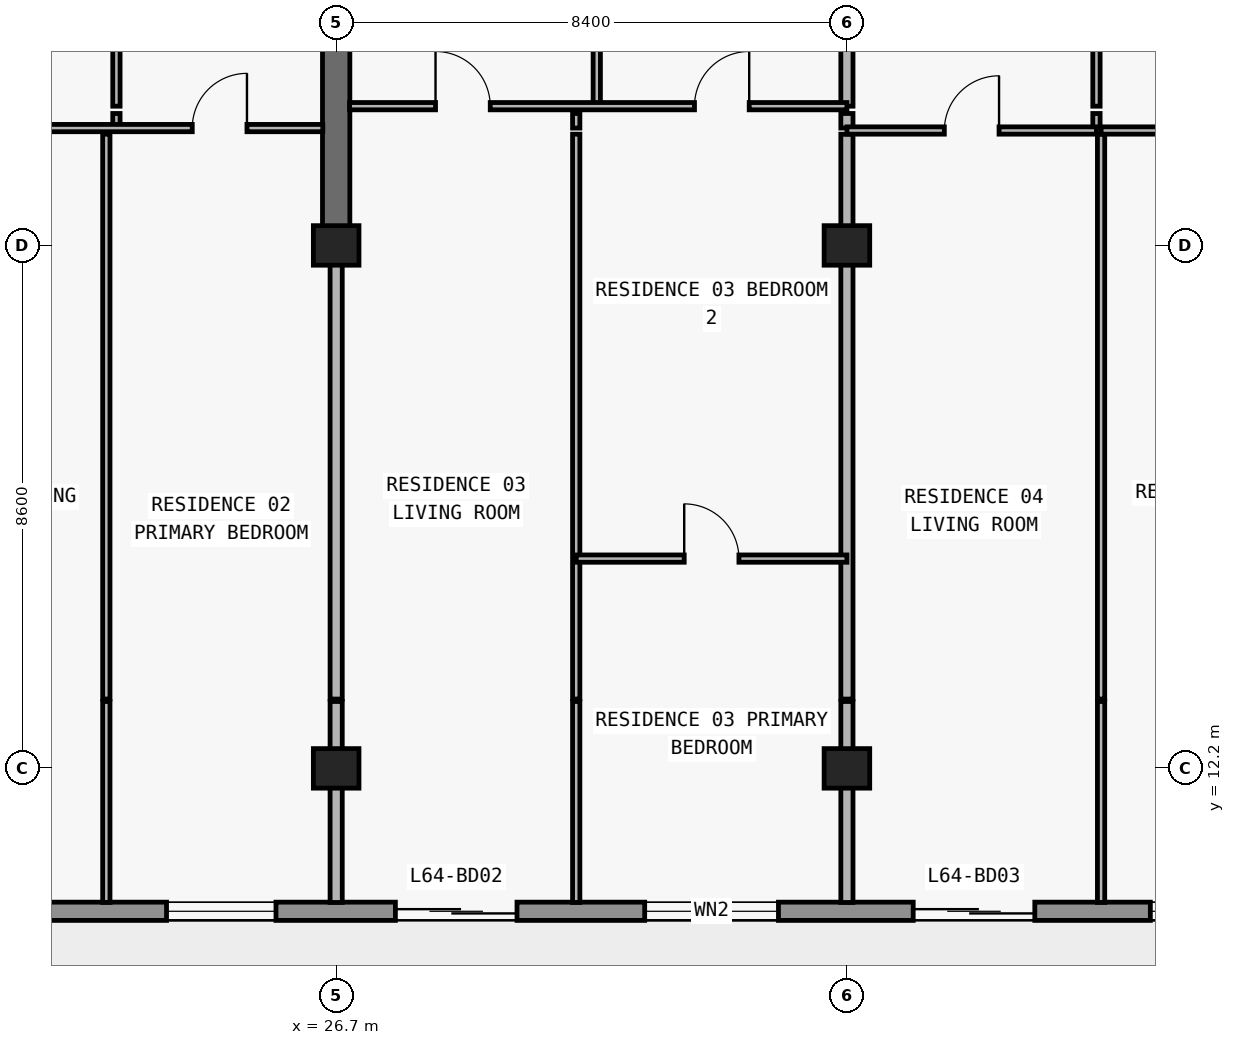
"""IFC4 building model, lengths in metres.
Left out: names, types, materials, properties, quantities, classifications, styles, units other than length and angle.
Written with IfcOpenShell. Run it as: python <this file> out.ifc"""

import sys

from ifc_helpers import new_model, si_unit, direction, frame, frame_2d, origin, origin_2d, place, context, subcontext, project, spatial, rectangle, extrude, element, fill, save


model = new_model("IFC4")
c1 = context("Model", 3, precision=1e-05, world=origin(), true_north=direction((0.0, 1.0)))
c2 = subcontext(c1, "Body", "Model", "MODEL_VIEW")
j1 = project(units=[si_unit("LENGTHUNIT", "METRE"), si_unit("PLANEANGLEUNIT", "RADIAN")], contexts=[c1])
p1 = place(None, origin())
s1 = spatial("IfcSite", under=j1, at=p1, CompositionType="ELEMENT")
p2 = place(p1, origin())
s2 = spatial("IfcBuilding", under=s1, at=p2, CompositionType="ELEMENT")
p3 = place(p2, frame((0.0, 0.0, 229.8)))
s3 = spatial("IfcBuildingStorey", under=s2, at=p3, CompositionType="ELEMENT", Elevation=229.8)
for number, where, z_axis, x_axis in (
    (1, (26.7, 12.2, 0.0), (0.0, 0.0, 1.0), (1.0, 0.0, 0.0)),
    (2, (35.1, 12.2, 0.0), (0.0, 0.0, 1.0), (1.0, 0.0, 0.0)),
    (3, (26.7, 20.8, 0.0), (0.0, 0.0, 1.0), (1.0, 0.0, 0.0)),
    (4, (35.1, 20.8, 0.0), (0.0, 0.0, 1.0), (1.0, 0.0, 0.0)),
):
    element("IfcColumn", number, at=place(p3, frame(where, z_axis=z_axis, x_axis=x_axis)), inside=s3, PredefinedType="COLUMN", context=c2, shape_type="SweptSolid", body=[
        extrude(rectangle(XDim=0.75, YDim=0.65, at=origin_2d()), origin(), (0.0, 0.0, 1.0), 3.05),
    ])
p4 = place(p3, frame((26.7, 20.8, 0.0), z_axis=(0.0, 0.0, 1.0), x_axis=(0.0, 1.0, 0.0)))
e5 = element("IfcWall", 5, at=p4, inside=s3, PredefinedType="SHEAR", context=c2, shape_type="SweptSolid", body=[
    extrude(rectangle(XDim=8.6, YDim=0.45, at=frame_2d((4.3, 0.0))), origin(), (0.0, 0.0, 1.0), 3.05),
])
p5 = place(p3, frame((65.7, 9.85, 0.0), z_axis=(0.0, 0.0, 1.0), x_axis=(-1.0, 0.0, 0.0)))
e6 = element("IfcWall", 6, at=p5, inside=s3, PredefinedType="STANDARD", context=c2, shape_type="SweptSolid", body=[
    extrude(rectangle(XDim=53.6, YDim=0.3, at=frame_2d((26.8, 0.0))), origin(), (0.0, 0.0, 1.0), 3.05),
])
p6 = place(p5, frame((48.05, 0.0, 0.85)))
e7 = element("IfcOpeningElement", 7, at=p6, cuts=e6, PredefinedType="OPENING", context=c2, shape_type="SweptSolid", body=[
    extrude(rectangle(XDim=1.8, YDim=1.55, at=frame_2d((0.9, 0.775))), frame((0.0, 0.16, 0.0), z_axis=(0.0, -1.0, 0.0), x_axis=(1.0, 0.0, 0.0)), (0.0, 0.0, 1.0), 0.32),
])
p7 = place(p5, frame((44.09, 0.0, 0.0)))
e8 = element("IfcOpeningElement", 8, at=p7, cuts=e6, PredefinedType="OPENING", context=c2, shape_type="SweptSolid", body=[
    extrude(rectangle(XDim=2.0, YDim=2.3, at=frame_2d((1.0, 1.15))), frame((0.0, 0.16, 0.0), z_axis=(0.0, -1.0, 0.0), x_axis=(1.0, 0.0, 0.0)), (0.0, 0.0, 1.0), 0.32),
])
p8 = place(p5, frame((39.99, 0.0, 0.85)))
e9 = element("IfcOpeningElement", 9, at=p8, cuts=e6, PredefinedType="OPENING", context=c2, shape_type="SweptSolid", body=[
    extrude(rectangle(XDim=1.8, YDim=1.55, at=frame_2d((0.9, 0.775))), frame((0.0, 0.16, 0.0), z_axis=(0.0, -1.0, 0.0), x_axis=(1.0, 0.0, 0.0)), (0.0, 0.0, 1.0), 0.32),
])
p9 = place(p5, frame((36.026, 0.0, 0.0)))
e10 = element("IfcOpeningElement", 10, at=p9, cuts=e6, PredefinedType="OPENING", context=c2, shape_type="SweptSolid", body=[
    extrude(rectangle(XDim=2.0, YDim=2.3, at=frame_2d((1.0, 1.15))), frame((0.0, 0.16, 0.0), z_axis=(0.0, -1.0, 0.0), x_axis=(1.0, 0.0, 0.0)), (0.0, 0.0, 1.0), 0.32),
])
p10 = place(p5, frame((31.726, 0.0, 0.85)))
e11 = element("IfcOpeningElement", 11, at=p10, cuts=e6, PredefinedType="OPENING", context=c2, shape_type="SweptSolid", body=[
    extrude(rectangle(XDim=2.2, YDim=1.55, at=frame_2d((1.1, 0.775))), frame((0.0, 0.16, 0.0), z_axis=(0.0, -1.0, 0.0), x_axis=(1.0, 0.0, 0.0)), (0.0, 0.0, 1.0), 0.32),
])
p11 = place(p5, frame((27.51, 0.0, 0.0)))
e12 = element("IfcOpeningElement", 12, at=p11, cuts=e6, PredefinedType="OPENING", context=c2, shape_type="SweptSolid", body=[
    extrude(rectangle(XDim=2.0, YDim=2.3, at=frame_2d((1.0, 1.15))), frame((0.0, 0.16, 0.0), z_axis=(0.0, -1.0, 0.0), x_axis=(1.0, 0.0, 0.0)), (0.0, 0.0, 1.0), 0.32),
])
p12 = place(p5, frame((23.81, 0.0, 0.85)))
e13 = element("IfcOpeningElement", 13, at=p12, cuts=e6, PredefinedType="OPENING", context=c2, shape_type="SweptSolid", body=[
    extrude(rectangle(XDim=1.8, YDim=1.55, at=frame_2d((0.9, 0.775))), frame((0.0, 0.16, 0.0), z_axis=(0.0, -1.0, 0.0), x_axis=(1.0, 0.0, 0.0)), (0.0, 0.0, 1.0), 0.32),
])
p13 = place(p5, frame((20.026, 0.0, 0.0)))
e14 = element("IfcOpeningElement", 14, at=p13, cuts=e6, PredefinedType="OPENING", context=c2, shape_type="SweptSolid", body=[
    extrude(rectangle(XDim=2.0, YDim=2.3, at=frame_2d((1.0, 1.15))), frame((0.0, 0.16, 0.0), z_axis=(0.0, -1.0, 0.0), x_axis=(1.0, 0.0, 0.0)), (0.0, 0.0, 1.0), 0.32),
])
p14 = place(p5, frame((15.726, 0.0, 0.85)))
e15 = element("IfcOpeningElement", 15, at=p14, cuts=e6, PredefinedType="OPENING", context=c2, shape_type="SweptSolid", body=[
    extrude(rectangle(XDim=2.2, YDim=1.55, at=frame_2d((1.1, 0.775))), frame((0.0, 0.16, 0.0), z_axis=(0.0, -1.0, 0.0), x_axis=(1.0, 0.0, 0.0)), (0.0, 0.0, 1.0), 0.32),
])
p15 = place(p5, frame((11.29, 0.0, 0.0)))
e16 = element("IfcOpeningElement", 16, at=p15, cuts=e6, PredefinedType="OPENING", context=c2, shape_type="SweptSolid", body=[
    extrude(rectangle(XDim=2.0, YDim=2.3, at=frame_2d((1.0, 1.15))), frame((0.0, 0.16, 0.0), z_axis=(0.0, -1.0, 0.0), x_axis=(1.0, 0.0, 0.0)), (0.0, 0.0, 1.0), 0.32),
])
p16 = place(p5, frame((7.19, 0.0, 0.85)))
e17 = element("IfcOpeningElement", 17, at=p16, cuts=e6, PredefinedType="OPENING", context=c2, shape_type="SweptSolid", body=[
    extrude(rectangle(XDim=1.8, YDim=1.55, at=frame_2d((0.9, 0.775))), frame((0.0, 0.16, 0.0), z_axis=(0.0, -1.0, 0.0), x_axis=(1.0, 0.0, 0.0)), (0.0, 0.0, 1.0), 0.32),
])
p17 = place(p5, frame((0.65, 0.0, 0.85)))
e18 = element("IfcOpeningElement", 18, at=p17, cuts=e6, PredefinedType="OPENING", context=c2, shape_type="SweptSolid", body=[
    extrude(rectangle(XDim=1.8, YDim=1.55, at=frame_2d((0.9, 0.775))), frame((0.0, 0.16, 0.0), z_axis=(0.0, -1.0, 0.0), x_axis=(1.0, 0.0, 0.0)), (0.0, 0.0, 1.0), 0.32),
])
p18 = place(p3, frame((22.92, 9.995, 0.0), z_axis=(0.0, 0.0, 1.0), x_axis=(0.0, 1.0, 0.0)))
e19 = element("IfcWall", 19, at=p18, inside=s3, PredefinedType="PARTITIONING", context=c2, shape_type="SweptSolid", body=[
    extrude(rectangle(XDim=3.305, YDim=0.12, at=frame_2d((1.652, 0.0))), origin(), (0.0, 0.0, 1.0), 3.05),
])
p19 = place(p3, frame((22.92, 13.34, 0.0), z_axis=(0.0, 0.0, 1.0), x_axis=(0.0, 1.0, 0.0)))
e20 = element("IfcWall", 20, at=p19, inside=s3, PredefinedType="PARTITIONING", context=c2, shape_type="SweptSolid", body=[
    extrude(rectangle(XDim=9.29, YDim=0.12, at=frame_2d((4.645, 0.0))), origin(), (0.0, 0.0, 1.0), 3.05),
])
p20 = place(p3, frame((23.086, 22.73, 0.0), z_axis=(0.0, 0.0, 1.0), x_axis=(0.0, 1.0, 0.0)))
e21 = element("IfcWall", 21, at=p20, inside=s3, PredefinedType="PARTITIONING", context=c2, shape_type="SweptSolid", body=[
    extrude(rectangle(XDim=0.24, YDim=0.12, at=frame_2d((0.12, 0.0))), origin(), (0.0, 0.0, 1.0), 3.05),
])
p21 = place(p3, frame((23.086, 23.09, 0.0), z_axis=(0.0, 0.0, 1.0), x_axis=(0.0, 1.0, 0.0)))
e22 = element("IfcWall", 22, at=p21, inside=s3, PredefinedType="PARTITIONING", context=c2, shape_type="SweptSolid", body=[
    extrude(rectangle(XDim=4.69, YDim=0.12, at=frame_2d((2.345, 0.0))), origin(), (0.0, 0.0, 1.0), 3.05),
])
p22 = place(p21, frame((1.895, 0.0, 0.0)))
e23 = element("IfcOpeningElement", 23, at=p22, cuts=e22, PredefinedType="OPENING", context=c2, shape_type="SweptSolid", body=[
    extrude(rectangle(XDim=0.9, YDim=2.15, at=frame_2d((0.45, 1.075))), frame((0.0, 0.07, 0.0), z_axis=(0.0, -1.0, 0.0), x_axis=(1.0, 0.0, 0.0)), (0.0, 0.0, 1.0), 0.14),
])
p23 = place(p3, frame((26.7, 9.995, 0.0), z_axis=(0.0, 0.0, 1.0), x_axis=(0.0, 1.0, 0.0)))
e24 = element("IfcWall", 24, at=p23, inside=s3, PredefinedType="PARTITIONING", context=c2, shape_type="SweptSolid", body=[
    extrude(rectangle(XDim=3.305, YDim=0.2, at=frame_2d((1.652, 0.0))), origin(), (0.0, 0.0, 1.0), 2.263),
])
p24 = place(p3, frame((26.7, 13.34, 0.0), z_axis=(0.0, 0.0, 1.0), x_axis=(0.0, 1.0, 0.0)))
e25 = element("IfcWall", 25, at=p24, inside=s3, PredefinedType="PARTITIONING", context=c2, shape_type="SweptSolid", body=[
    extrude(rectangle(XDim=7.455, YDim=0.2, at=frame_2d((3.728, 0.0))), origin(), (0.0, 0.0, 1.0), 2.263),
])
p25 = place(p3, frame((30.648, 9.995, 0.0), z_axis=(0.0, 0.0, 1.0), x_axis=(0.0, 1.0, 0.0)))
e26 = element("IfcWall", 26, at=p25, inside=s3, PredefinedType="PARTITIONING", context=c2, shape_type="SweptSolid", body=[
    extrude(rectangle(XDim=3.305, YDim=0.12, at=frame_2d((1.652, 0.0))), origin(), (0.0, 0.0, 1.0), 3.05),
])
p26 = place(p3, frame((30.648, 13.34, 0.0), z_axis=(0.0, 0.0, 1.0), x_axis=(0.0, 1.0, 0.0)))
e27 = element("IfcWall", 27, at=p26, inside=s3, PredefinedType="PARTITIONING", context=c2, shape_type="SweptSolid", body=[
    extrude(rectangle(XDim=9.29, YDim=0.12, at=frame_2d((4.645, 0.0))), origin(), (0.0, 0.0, 1.0), 3.05),
])
p27 = place(p3, frame((30.648, 22.73, 0.0), z_axis=(0.0, 0.0, 1.0), x_axis=(0.0, 1.0, 0.0)))
e28 = element("IfcWall", 28, at=p27, inside=s3, PredefinedType="PARTITIONING", context=c2, shape_type="SweptSolid", body=[
    extrude(rectangle(XDim=0.24, YDim=0.12, at=frame_2d((0.12, 0.0))), origin(), (0.0, 0.0, 1.0), 3.05),
])
p28 = place(p3, frame((30.986, 23.09, 0.0), z_axis=(0.0, 0.0, 1.0), x_axis=(0.0, 1.0, 0.0)))
e29 = element("IfcWall", 29, at=p28, inside=s3, PredefinedType="PARTITIONING", context=c2, shape_type="SweptSolid", body=[
    extrude(rectangle(XDim=4.69, YDim=0.12, at=frame_2d((2.345, 0.0))), origin(), (0.0, 0.0, 1.0), 3.05),
])
p29 = place(p28, frame((1.895, 0.0, 0.0)))
e30 = element("IfcOpeningElement", 30, at=p29, cuts=e29, PredefinedType="OPENING", context=c2, shape_type="SweptSolid", body=[
    extrude(rectangle(XDim=0.9, YDim=2.15, at=frame_2d((0.45, 1.075))), frame((0.0, 0.07, 0.0), z_axis=(0.0, -1.0, 0.0), x_axis=(1.0, 0.0, 0.0)), (0.0, 0.0, 1.0), 0.14),
])
p30 = place(p3, frame((35.1, 9.995, 0.0), z_axis=(0.0, 0.0, 1.0), x_axis=(0.0, 1.0, 0.0)))
e31 = element("IfcWall", 31, at=p30, inside=s3, PredefinedType="PARTITIONING", context=c2, shape_type="SweptSolid", body=[
    extrude(rectangle(XDim=3.305, YDim=0.2, at=frame_2d((1.652, 0.0))), origin(), (0.0, 0.0, 1.0), 2.263),
])
p31 = place(p3, frame((35.1, 13.34, 0.0), z_axis=(0.0, 0.0, 1.0), x_axis=(0.0, 1.0, 0.0)))
e32 = element("IfcWall", 32, at=p31, inside=s3, PredefinedType="PARTITIONING", context=c2, shape_type="SweptSolid", body=[
    extrude(rectangle(XDim=9.29, YDim=0.2, at=frame_2d((4.645, 0.0))), origin(), (0.0, 0.0, 1.0), 2.263),
])
p32 = place(p3, frame((35.1, 22.73, 0.0), z_axis=(0.0, 0.0, 1.0), x_axis=(0.0, 1.0, 0.0)))
e33 = element("IfcWall", 33, at=p32, inside=s3, PredefinedType="PARTITIONING", context=c2, shape_type="SweptSolid", body=[
    extrude(rectangle(XDim=0.24, YDim=0.2, at=frame_2d((0.12, 0.0))), origin(), (0.0, 0.0, 1.0), 2.263),
])
p33 = place(p3, frame((35.1, 23.09, 0.0), z_axis=(0.0, 0.0, 1.0), x_axis=(0.0, 1.0, 0.0)))
e34 = element("IfcWall", 34, at=p33, inside=s3, PredefinedType="PARTITIONING", context=c2, shape_type="SweptSolid", body=[
    extrude(rectangle(XDim=4.69, YDim=0.2, at=frame_2d((2.345, 0.0))), origin(), (0.0, 0.0, 1.0), 2.263),
])
p34 = place(p3, frame((39.204, 22.73, 0.0), z_axis=(0.0, 0.0, 1.0), x_axis=(0.0, 1.0, 0.0)))
e35 = element("IfcWall", 35, at=p34, inside=s3, PredefinedType="PARTITIONING", context=c2, shape_type="SweptSolid", body=[
    extrude(rectangle(XDim=0.24, YDim=0.12, at=frame_2d((0.12, 0.0))), origin(), (0.0, 0.0, 1.0), 3.05),
])
p35 = place(p3, frame((39.204, 23.09, 0.0), z_axis=(0.0, 0.0, 1.0), x_axis=(0.0, 1.0, 0.0)))
e36 = element("IfcWall", 36, at=p35, inside=s3, PredefinedType="PARTITIONING", context=c2, shape_type="SweptSolid", body=[
    extrude(rectangle(XDim=4.69, YDim=0.12, at=frame_2d((2.345, 0.0))), origin(), (0.0, 0.0, 1.0), 3.05),
])
p36 = place(p35, frame((1.895, 0.0, 0.0)))
e37 = element("IfcOpeningElement", 37, at=p36, cuts=e36, PredefinedType="OPENING", context=c2, shape_type="SweptSolid", body=[
    extrude(rectangle(XDim=0.9, YDim=2.15, at=frame_2d((0.45, 1.075))), frame((0.0, 0.07, 0.0), z_axis=(0.0, -1.0, 0.0), x_axis=(1.0, 0.0, 0.0)), (0.0, 0.0, 1.0), 0.14),
])
p37 = place(p3, frame((39.28, 9.995, 0.0), z_axis=(0.0, 0.0, 1.0), x_axis=(0.0, 1.0, 0.0)))
e38 = element("IfcWall", 38, at=p37, inside=s3, PredefinedType="PARTITIONING", context=c2, shape_type="SweptSolid", body=[
    extrude(rectangle(XDim=3.305, YDim=0.12, at=frame_2d((1.652, 0.0))), origin(), (0.0, 0.0, 1.0), 3.05),
])
p38 = place(p3, frame((39.28, 13.34, 0.0), z_axis=(0.0, 0.0, 1.0), x_axis=(0.0, 1.0, 0.0)))
e39 = element("IfcWall", 39, at=p38, inside=s3, PredefinedType="PARTITIONING", context=c2, shape_type="SweptSolid", body=[
    extrude(rectangle(XDim=9.29, YDim=0.12, at=frame_2d((4.645, 0.0))), origin(), (0.0, 0.0, 1.0), 3.05),
])
p39 = place(p3, frame((30.648, 15.65, 0.0), z_axis=(0.0, 0.0, 1.0), x_axis=(1.0, 0.0, 0.0)))
e40 = element("IfcWall", 40, at=p39, inside=s3, PredefinedType="PARTITIONING", context=c2, shape_type="SweptSolid", body=[
    extrude(rectangle(XDim=4.452, YDim=0.12, at=frame_2d((2.226, 0.0))), origin(), (0.0, 0.0, 1.0), 3.05),
])
p40 = place(p39, frame((1.776, 0.0, 0.0)))
e41 = element("IfcOpeningElement", 41, at=p40, cuts=e40, PredefinedType="OPENING", context=c2, shape_type="SweptSolid", body=[
    extrude(rectangle(XDim=0.9, YDim=2.15, at=frame_2d((0.45, 1.075))), frame((0.0, 0.07, 0.0), z_axis=(0.0, -1.0, 0.0), x_axis=(1.0, 0.0, 0.0)), (0.0, 0.0, 1.0), 0.14),
])
p41 = place(p3, frame((35.1, 22.69, 0.0), z_axis=(0.0, 0.0, 1.0), x_axis=(1.0, 0.0, 0.0)))
e42 = element("IfcWall", 42, at=p41, inside=s3, PredefinedType="PARTITIONING", context=c2, shape_type="SweptSolid", body=[
    extrude(rectangle(XDim=4.104, YDim=0.12, at=frame_2d((2.052, 0.0))), origin(), (0.0, 0.0, 1.0), 3.05),
])
p42 = place(p41, frame((1.602, 0.0, 0.0)))
e43 = element("IfcOpeningElement", 43, at=p42, cuts=e42, PredefinedType="OPENING", context=c2, shape_type="SweptSolid", body=[
    extrude(rectangle(XDim=0.9, YDim=2.15, at=frame_2d((0.45, 1.075))), frame((0.0, 0.07, 0.0), z_axis=(0.0, -1.0, 0.0), x_axis=(1.0, 0.0, 0.0)), (0.0, 0.0, 1.0), 0.14),
])
p43 = place(p3, frame((39.28, 22.69, 0.0), z_axis=(0.0, 0.0, 1.0), x_axis=(1.0, 0.0, 0.0)))
e44 = element("IfcWall", 44, at=p43, inside=s3, PredefinedType="PARTITIONING", context=c2, shape_type="SweptSolid", body=[
    extrude(rectangle(XDim=3.42, YDim=0.12, at=frame_2d((1.71, 0.0))), origin(), (0.0, 0.0, 1.0), 3.05),
])
p44 = place(p43, frame((1.26, 0.0, 0.0)))
e45 = element("IfcOpeningElement", 45, at=p44, cuts=e44, PredefinedType="OPENING", context=c2, shape_type="SweptSolid", body=[
    extrude(rectangle(XDim=0.9, YDim=2.15, at=frame_2d((0.45, 1.075))), frame((0.0, 0.07, 0.0), z_axis=(0.0, -1.0, 0.0), x_axis=(1.0, 0.0, 0.0)), (0.0, 0.0, 1.0), 0.14),
])
p45 = place(p3, frame((18.3, 22.73, 0.0), z_axis=(0.0, 0.0, 1.0), x_axis=(1.0, 0.0, 0.0)))
e46 = element("IfcWall", 46, at=p45, inside=s3, PredefinedType="PARTITIONING", context=c2, shape_type="SweptSolid", body=[
    extrude(rectangle(XDim=8.18, YDim=0.12, at=frame_2d((4.09, 0.0))), origin(), (0.0, 0.0, 1.0), 3.05),
])
p46 = place(p45, frame((1.86, 0.0, 0.0)))
e47 = element("IfcOpeningElement", 47, at=p46, cuts=e46, PredefinedType="OPENING", context=c2, shape_type="SweptSolid", body=[
    extrude(rectangle(XDim=0.9, YDim=2.15, at=frame_2d((0.45, 1.075))), frame((0.0, 0.07, 0.0), z_axis=(0.0, -1.0, 0.0), x_axis=(1.0, 0.0, 0.0)), (0.0, 0.0, 1.0), 0.14),
])
p47 = place(p45, frame((6.033, 0.0, 0.0)))
e48 = element("IfcOpeningElement", 48, at=p47, cuts=e46, PredefinedType="OPENING", context=c2, shape_type="SweptSolid", body=[
    extrude(rectangle(XDim=0.9, YDim=2.15, at=frame_2d((0.45, 1.075))), frame((0.0, 0.07, 0.0), z_axis=(0.0, -1.0, 0.0), x_axis=(1.0, 0.0, 0.0)), (0.0, 0.0, 1.0), 0.14),
])
p48 = place(p3, frame((26.92, 23.09, 0.0), z_axis=(0.0, 0.0, 1.0), x_axis=(1.0, 0.0, 0.0)))
e49 = element("IfcWall", 49, at=p48, inside=s3, PredefinedType="PARTITIONING", context=c2, shape_type="SweptSolid", body=[
    extrude(rectangle(XDim=8.18, YDim=0.12, at=frame_2d((4.09, 0.0))), origin(), (0.0, 0.0, 1.0), 3.05),
])
p49 = place(p48, frame((1.414, 0.0, 0.0)))
e50 = element("IfcOpeningElement", 50, at=p49, cuts=e49, PredefinedType="OPENING", context=c2, shape_type="SweptSolid", body=[
    extrude(rectangle(XDim=0.9, YDim=2.15, at=frame_2d((0.45, 1.075))), frame((0.0, 0.07, 0.0), z_axis=(0.0, -1.0, 0.0), x_axis=(1.0, 0.0, 0.0)), (0.0, 0.0, 1.0), 0.14),
])
p50 = place(p48, frame((5.673, 0.0, 0.0)))
e51 = element("IfcOpeningElement", 51, at=p50, cuts=e49, PredefinedType="OPENING", context=c2, shape_type="SweptSolid", body=[
    extrude(rectangle(XDim=0.9, YDim=2.15, at=frame_2d((0.45, 1.075))), frame((0.0, 0.07, 0.0), z_axis=(0.0, -1.0, 0.0), x_axis=(1.0, 0.0, 0.0)), (0.0, 0.0, 1.0), 0.14),
])
p51 = place(p8, origin())
e52 = element("IfcWindow", 52, at=p51, inside=s3, PartitioningType="SINGLE_PANEL", PredefinedType="WINDOW", context=c2, shape_type="SweptSolid", body=[
    extrude(rectangle(XDim=1.8, YDim=1.55, at=frame_2d((0.9, 0.775))), frame((0.0, 0.03, 0.0), z_axis=(0.0, -1.0, 0.0), x_axis=(1.0, 0.0, 0.0)), (0.0, 0.0, 1.0), 0.06),
])
fill(e9, e52)
p52 = place(p9, origin())
e53 = element("IfcDoor", 53, at=p52, inside=s3, OperationType="DOUBLE_DOOR_SLIDING", PredefinedType="DOOR", context=c2, shape_type="SweptSolid", body=[
    extrude(rectangle(XDim=2.0, YDim=2.3, at=frame_2d((1.0, 1.15))), frame((0.0, 0.025, 0.0), z_axis=(0.0, -1.0, 0.0), x_axis=(1.0, 0.0, 0.0)), (0.0, 0.0, 1.0), 0.05),
])
fill(e10, e53)
p53 = place(p10, origin())
e54 = element("IfcWindow", 54, at=p53, inside=s3, PartitioningType="SINGLE_PANEL", PredefinedType="WINDOW", context=c2, shape_type="SweptSolid", body=[
    extrude(rectangle(XDim=2.2, YDim=1.55, at=frame_2d((1.1, 0.775))), frame((0.0, 0.03, 0.0), z_axis=(0.0, -1.0, 0.0), x_axis=(1.0, 0.0, 0.0)), (0.0, 0.0, 1.0), 0.06),
])
fill(e11, e54)
p54 = place(p11, origin())
e55 = element("IfcDoor", 55, at=p54, inside=s3, OperationType="DOUBLE_DOOR_SLIDING", PredefinedType="DOOR", context=c2, shape_type="SweptSolid", body=[
    extrude(rectangle(XDim=2.0, YDim=2.3, at=frame_2d((1.0, 1.15))), frame((0.0, 0.025, 0.0), z_axis=(0.0, -1.0, 0.0), x_axis=(1.0, 0.0, 0.0)), (0.0, 0.0, 1.0), 0.05),
])
fill(e12, e55)
p55 = place(p12, origin())
e56 = element("IfcWindow", 56, at=p55, inside=s3, PartitioningType="SINGLE_PANEL", PredefinedType="WINDOW", context=c2, shape_type="SweptSolid", body=[
    extrude(rectangle(XDim=1.8, YDim=1.55, at=frame_2d((0.9, 0.775))), frame((0.0, 0.03, 0.0), z_axis=(0.0, -1.0, 0.0), x_axis=(1.0, 0.0, 0.0)), (0.0, 0.0, 1.0), 0.06),
])
fill(e13, e56)
p56 = place(p47, origin())
e57 = element("IfcDoor", 57, at=p56, inside=s3, OperationType="SINGLE_SWING_RIGHT", PredefinedType="DOOR", context=c2, shape_type="SweptSolid", body=[
    extrude(rectangle(XDim=0.9, YDim=2.15, at=frame_2d((0.45, 1.075))), frame((0.0, 0.025, 0.0), z_axis=(0.0, -1.0, 0.0), x_axis=(1.0, 0.0, 0.0)), (0.0, 0.0, 1.0), 0.05),
])
fill(e48, e57)
p57 = place(p49, origin())
e58 = element("IfcDoor", 58, at=p57, inside=s3, OperationType="SINGLE_SWING_LEFT", PredefinedType="DOOR", context=c2, shape_type="SweptSolid", body=[
    extrude(rectangle(XDim=0.9, YDim=2.15, at=frame_2d((0.45, 1.075))), frame((0.0, 0.025, 0.0), z_axis=(0.0, -1.0, 0.0), x_axis=(1.0, 0.0, 0.0)), (0.0, 0.0, 1.0), 0.05),
])
fill(e50, e58)
p58 = place(p50, origin())
e59 = element("IfcDoor", 59, at=p58, inside=s3, OperationType="SINGLE_SWING_RIGHT", PredefinedType="DOOR", context=c2, shape_type="SweptSolid", body=[
    extrude(rectangle(XDim=0.9, YDim=2.15, at=frame_2d((0.45, 1.075))), frame((0.0, 0.025, 0.0), z_axis=(0.0, -1.0, 0.0), x_axis=(1.0, 0.0, 0.0)), (0.0, 0.0, 1.0), 0.05),
])
fill(e51, e59)
p59 = place(p40, origin())
e60 = element("IfcDoor", 60, at=p59, inside=s3, OperationType="SINGLE_SWING_LEFT", PredefinedType="DOOR", context=c2, shape_type="SweptSolid", body=[
    extrude(rectangle(XDim=0.9, YDim=2.15, at=frame_2d((0.45, 1.075))), frame((0.0, 0.025, 0.0), z_axis=(0.0, -1.0, 0.0), x_axis=(1.0, 0.0, 0.0)), (0.0, 0.0, 1.0), 0.05),
])
fill(e41, e60)
p60 = place(p42, origin())
e61 = element("IfcDoor", 61, at=p60, inside=s3, OperationType="SINGLE_SWING_RIGHT", PredefinedType="DOOR", context=c2, shape_type="SweptSolid", body=[
    extrude(rectangle(XDim=0.9, YDim=2.15, at=frame_2d((0.45, 1.075))), frame((0.0, 0.025, 0.0), z_axis=(0.0, -1.0, 0.0), x_axis=(1.0, 0.0, 0.0)), (0.0, 0.0, 1.0), 0.05),
])
fill(e43, e61)
save(model, sys.argv[1])
